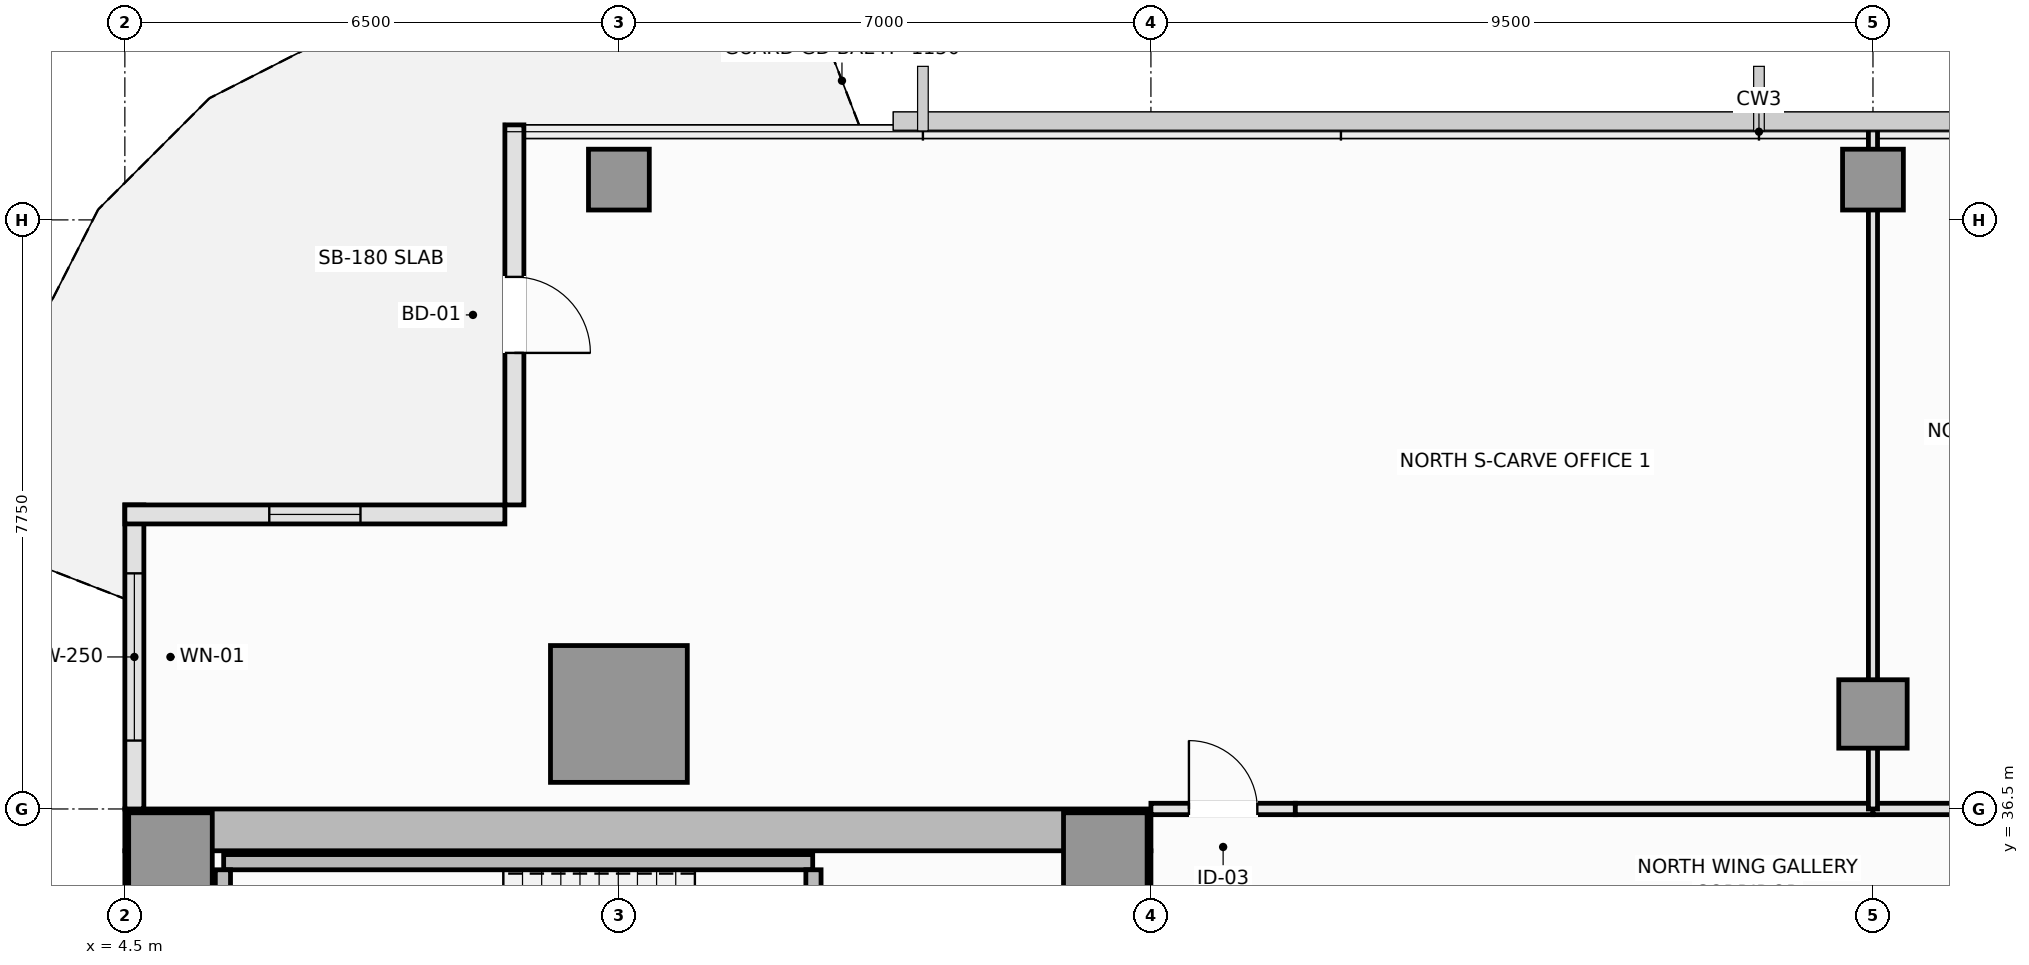
"""IFC4 building model, lengths in metres.
Left out: names, types, materials, properties, quantities, classifications, styles, units other than length and angle.
Written with IfcOpenShell. Run it as: python <this file> out.ifc"""

import sys

from ifc_helpers import new_model, si_unit, direction, frame, frame_2d, origin, origin_2d, place, context, subcontext, project, spatial, rectangle, extrude, element, fill, save


model = new_model("IFC4")
c1 = context("Model", 3, precision=1e-05, world=origin(), true_north=direction((0.0, 1.0)))
c2 = subcontext(c1, "Body", "Model", "MODEL_VIEW")
j1 = project(units=[si_unit("LENGTHUNIT", "METRE"), si_unit("PLANEANGLEUNIT", "RADIAN")], contexts=[c1])
p1 = place(None, origin())
s1 = spatial("IfcSite", under=j1, at=p1, CompositionType="ELEMENT")
p2 = place(p1, origin())
s2 = spatial("IfcBuilding", under=s1, at=p2, CompositionType="ELEMENT")
p3 = place(p2, frame((0.0, 0.0, 212.9)))
s3 = spatial("IfcBuildingStorey", under=s2, at=p3, CompositionType="ELEMENT", Elevation=212.9)
p4 = place(p3, frame((4.5, 36.225, 0.0), z_axis=(0.0, 0.0, 1.0), x_axis=(1.0, 0.0, 0.0)))
e1 = element("IfcWall", 1, at=p4, inside=s3, PredefinedType="SHEAR", context=c2, shape_type="SweptSolid", body=[
    extrude(rectangle(XDim=13.5, YDim=0.55, at=frame_2d((6.75, 0.0))), origin(), (0.0, 0.0, 1.0), 3.55),
])
p5 = place(p3, frame((4.775, 14.55, 0.0), z_axis=(0.0, 0.0, 1.0), x_axis=(0.0, 1.0, 0.0)))
e2 = element("IfcWall", 2, at=p5, inside=s3, PredefinedType="SHEAR", context=c2, shape_type="SweptSolid", body=[
    extrude(rectangle(XDim=21.4, YDim=0.55, at=frame_2d((10.7, 0.0))), origin(), (0.0, 0.0, 1.0), 3.55),
])
p6 = place(p3, frame((17.725, 27.05, 0.0), z_axis=(0.0, 0.0, 1.0), x_axis=(0.0, 1.0, 0.0)))
e3 = element("IfcWall", 3, at=p6, inside=s3, PredefinedType="SHEAR", context=c2, shape_type="SweptSolid", body=[
    extrude(rectangle(XDim=8.9, YDim=0.55, at=frame_2d((4.45, 0.0))), origin(), (0.0, 0.0, 1.0), 3.55),
])
p7 = place(p6, frame((3.45, 0.0, 0.0)))
e4 = element("IfcOpeningElement", 4, at=p7, cuts=e3, PredefinedType="OPENING", context=c2, shape_type="SweptSolid", body=[
    extrude(rectangle(XDim=1.1, YDim=2.15, at=frame_2d((0.55, 1.075))), frame((0.0, 0.285, 0.0), z_axis=(0.0, -1.0, 0.0), x_axis=(1.0, 0.0, 0.0)), (0.0, 0.0, 1.0), 0.57),
])
for number, where, z_axis, x_axis in (
    (5, (5.1, 35.9, 0.0), (0.0, 0.0, 1.0), (1.0, 0.0, 0.0)),
    (6, (17.4, 35.9, 0.0), (0.0, 0.0, 1.0), (1.0, 0.0, 0.0)),
):
    element("IfcColumn", number, at=place(p3, frame(where, z_axis=z_axis, x_axis=x_axis)), inside=s3, PredefinedType="PILASTER", context=c2, shape_type="SweptSolid", body=[
        extrude(rectangle(XDim=1.1, YDim=1.1, at=origin_2d()), origin(), (0.0, 0.0, 1.0), 3.55),
    ])
p8 = place(p3, frame((11.0, 37.75, 0.0), z_axis=(0.0, 0.0, 1.0), x_axis=(1.0, 0.0, 0.0)))
e7 = element("IfcColumn", 7, at=p8, inside=s3, PredefinedType="COLUMN", context=c2, shape_type="SweptSolid", body=[
    extrude(rectangle(XDim=1.8, YDim=1.8, at=origin_2d()), origin(), (0.0, 0.0, 1.0), 3.55),
])
p9 = place(p3, frame((27.5, 37.75, 0.0), z_axis=(0.0, 0.0, 1.0), x_axis=(1.0, 0.0, 0.0)))
e8 = element("IfcColumn", 8, at=p9, inside=s3, PredefinedType="COLUMN", context=c2, shape_type="SweptSolid", body=[
    extrude(rectangle(XDim=0.9, YDim=0.9, at=origin_2d()), origin(), (0.0, 0.0, 1.0), 3.55),
])
for number, where, z_axis, x_axis in (
    (9, (11.0, 44.78, 0.0), (0.0, 0.0, 1.0), (1.0, 0.0, 0.0)),
    (10, (27.5, 44.78, 0.0), (0.0, 0.0, 1.0), (1.0, 0.0, 0.0)),
):
    element("IfcColumn", number, at=place(p3, frame(where, z_axis=z_axis, x_axis=x_axis)), inside=s3, PredefinedType="COLUMN", context=c2, shape_type="SweptSolid", body=[
        extrude(rectangle(XDim=0.8, YDim=0.8, at=origin_2d()), origin(), (0.0, 0.0, 1.0), 3.55),
    ])
p10 = place(p3, frame((4.625, 40.5, 0.0), z_axis=(0.0, 0.0, 1.0), x_axis=(0.0, -1.0, 0.0)))
e11 = element("IfcWall", 11, at=p10, inside=s3, PredefinedType="SOLIDWALL", context=c2, shape_type="SweptSolid", body=[
    extrude(rectangle(XDim=4.0, YDim=0.25, at=frame_2d((2.0, 0.0))), origin(), (0.0, 0.0, 1.0), 3.37),
])
p11 = place(p10, frame((0.9, 0.0, 0.9)))
e12 = element("IfcOpeningElement", 12, at=p11, cuts=e11, PredefinedType="OPENING", context=c2, shape_type="SweptSolid", body=[
    extrude(rectangle(XDim=2.2, YDim=1.8, at=frame_2d((1.1, 0.9))), frame((0.0, 0.135, 0.0), z_axis=(0.0, -1.0, 0.0), x_axis=(1.0, 0.0, 0.0)), (0.0, 0.0, 1.0), 0.27),
])
p12 = place(p3, frame((9.625, 45.5, 0.0), z_axis=(0.0, 0.0, 1.0), x_axis=(0.0, -1.0, 0.0)))
e13 = element("IfcWall", 13, at=p12, inside=s3, PredefinedType="SOLIDWALL", context=c2, shape_type="SweptSolid", body=[
    extrude(rectangle(XDim=5.0, YDim=0.25, at=frame_2d((2.5, 0.0))), origin(), (0.0, 0.0, 1.0), 3.1),
])
p13 = place(p12, frame((2.0, 0.0, 0.0)))
e14 = element("IfcOpeningElement", 14, at=p13, cuts=e13, PredefinedType="OPENING", context=c2, shape_type="SweptSolid", body=[
    extrude(rectangle(XDim=1.0, YDim=2.2, at=frame_2d((0.5, 1.1))), frame((0.0, 0.135, 0.0), z_axis=(0.0, -1.0, 0.0), x_axis=(1.0, 0.0, 0.0)), (0.0, 0.0, 1.0), 0.27),
])
p14 = place(p3, frame((9.5, 40.375, 0.0), z_axis=(0.0, 0.0, 1.0), x_axis=(-1.0, 0.0, 0.0)))
e15 = element("IfcWall", 15, at=p14, inside=s3, PredefinedType="SOLIDWALL", context=c2, shape_type="SweptSolid", body=[
    extrude(rectangle(XDim=5.0, YDim=0.25, at=frame_2d((2.5, 0.0))), origin(), (0.0, 0.0, 1.0), 3.37),
])
p15 = place(p14, frame((1.9, 0.0, 0.9)))
e16 = element("IfcOpeningElement", 16, at=p15, cuts=e15, PredefinedType="OPENING", context=c2, shape_type="SweptSolid", body=[
    extrude(rectangle(XDim=1.2, YDim=1.8, at=frame_2d((0.6, 0.9))), frame((0.0, 0.135, 0.0), z_axis=(0.0, -1.0, 0.0), x_axis=(1.0, 0.0, 0.0)), (0.0, 0.0, 1.0), 0.27),
])
p16 = place(p3, frame((5.8, 35.8, 0.0), z_axis=(0.0, 0.0, 1.0), x_axis=(1.0, 0.0, 0.0)))
e17 = element("IfcWall", 17, at=p16, inside=s3, PredefinedType="SOLIDWALL", context=c2, shape_type="SweptSolid", body=[
    extrude(rectangle(XDim=7.75, YDim=0.2, at=frame_2d((3.875, 0.0))), origin(), (0.0, 0.0, 1.0), 3.55),
])
p17 = place(p3, frame((5.79, 32.65, 0.0), z_axis=(0.0, 0.0, 1.0), x_axis=(0.0, 1.0, 0.0)))
e18 = element("IfcWall", 18, at=p17, inside=s3, PredefinedType="SOLIDWALL", context=c2, shape_type="SweptSolid", body=[
    extrude(rectangle(XDim=3.05, YDim=0.2, at=frame_2d((1.525, 0.0))), origin(), (0.0, 0.0, 1.0), 3.55),
])
p18 = place(p3, frame((13.56, 32.65, 0.0), z_axis=(0.0, 0.0, 1.0), x_axis=(0.0, 1.0, 0.0)))
e19 = element("IfcWall", 19, at=p18, inside=s3, PredefinedType="SOLIDWALL", context=c2, shape_type="SweptSolid", body=[
    extrude(rectangle(XDim=3.05, YDim=0.2, at=frame_2d((1.525, 0.0))), origin(), (0.0, 0.0, 1.0), 3.55),
])
p19 = place(p18, frame((0.95, 0.0, 0.0)))
e20 = element("IfcOpeningElement", 20, at=p19, cuts=e19, PredefinedType="OPENING", context=c2, shape_type="SweptSolid", body=[
    extrude(rectangle(XDim=1.15, YDim=2.15, at=frame_2d((0.575, 1.075))), frame((0.0, 0.11, 0.0), z_axis=(0.0, -1.0, 0.0), x_axis=(1.0, 0.0, 0.0)), (0.0, 0.0, 1.0), 0.22),
])
p20 = place(p3, frame((18.0, 36.5, 0.0), z_axis=(0.0, 0.0, 1.0), x_axis=(1.0, 0.0, 0.0)))
e21 = element("IfcWall", 21, at=p20, inside=s3, PredefinedType="PARTITIONING", context=c2, shape_type="SweptSolid", body=[
    extrude(rectangle(XDim=1.9, YDim=0.15, at=frame_2d((0.95, 0.0))), origin(), (0.0, 0.0, 1.0), 3.37),
])
p21 = place(p20, frame((0.5, 0.0, 0.0)))
e22 = element("IfcOpeningElement", 22, at=p21, cuts=e21, PredefinedType="OPENING", context=c2, shape_type="SweptSolid", body=[
    extrude(rectangle(XDim=0.9, YDim=2.1, at=frame_2d((0.45, 1.05))), frame((0.0, 0.085, 0.0), z_axis=(0.0, -1.0, 0.0), x_axis=(1.0, 0.0, 0.0)), (0.0, 0.0, 1.0), 0.17),
])
p22 = place(p3, frame((19.9, 36.5, 0.0), z_axis=(0.0, 0.0, 1.0), x_axis=(1.0, 0.0, 0.0)))
e23 = element("IfcWall", 23, at=p22, inside=s3, PredefinedType="PARTITIONING", context=c2, shape_type="SweptSolid", body=[
    extrude(rectangle(XDim=7.6, YDim=0.15, at=frame_2d((3.8, 0.0))), origin(), (0.0, 0.0, 1.0), 3.37),
])
p23 = place(p3, frame((27.5, 36.5, 0.0), z_axis=(0.0, 0.0, 1.0), x_axis=(1.0, 0.0, 0.0)))
e24 = element("IfcWall", 24, at=p23, inside=s3, PredefinedType="PARTITIONING", context=c2, shape_type="SweptSolid", body=[
    extrude(rectangle(XDim=3.5, YDim=0.15, at=frame_2d((1.75, 0.0))), origin(), (0.0, 0.0, 1.0), 3.37),
])
p24 = place(p23, frame((1.25, 0.0, 0.0)))
e25 = element("IfcOpeningElement", 25, at=p24, cuts=e24, PredefinedType="OPENING", context=c2, shape_type="SweptSolid", body=[
    extrude(rectangle(XDim=1.0, YDim=2.15, at=frame_2d((0.5, 1.075))), frame((0.0, 0.085, 0.0), z_axis=(0.0, -1.0, 0.0), x_axis=(1.0, 0.0, 0.0)), (0.0, 0.0, 1.0), 0.17),
])
p25 = place(p3, frame((27.5, 36.5, 0.0), z_axis=(0.0, 0.0, 1.0), x_axis=(0.0, 1.0, 0.0)))
e26 = element("IfcWall", 26, at=p25, inside=s3, PredefinedType="PARTITIONING", context=c2, shape_type="SweptSolid", body=[
    extrude(rectangle(XDim=8.99, YDim=0.12, at=frame_2d((4.495, 0.0))), origin(), (0.0, 0.0, 1.0), 2.92),
])
p26 = place(p11, origin())
e27 = element("IfcWindow", 27, at=p26, inside=s3, PartitioningType="SINGLE_PANEL", PredefinedType="WINDOW", context=c2, shape_type="SweptSolid", body=[
    extrude(rectangle(XDim=2.2, YDim=1.8, at=frame_2d((1.1, 0.9))), frame((0.0, 0.03, 0.0), z_axis=(0.0, -1.0, 0.0), x_axis=(1.0, 0.0, 0.0)), (0.0, 0.0, 1.0), 0.06),
])
fill(e12, e27)
p27 = place(p13, frame((1.0, 0.0, 0.0), z_axis=(0.0, 0.0, 1.0), x_axis=(-1.0, 0.0, 0.0)))
e28 = element("IfcDoor", 28, at=p27, inside=s3, OperationType="SINGLE_SWING_RIGHT", PredefinedType="DOOR", context=c2, shape_type="SweptSolid", body=[
    extrude(rectangle(XDim=1.0, YDim=2.2, at=frame_2d((0.5, 1.1))), frame((0.0, 0.025, 0.0), z_axis=(0.0, -1.0, 0.0), x_axis=(1.0, 0.0, 0.0)), (0.0, 0.0, 1.0), 0.05),
])
fill(e14, e28)
p28 = place(p15, origin())
e29 = element("IfcWindow", 29, at=p28, inside=s3, PartitioningType="SINGLE_PANEL", PredefinedType="WINDOW", context=c2, shape_type="SweptSolid", body=[
    extrude(rectangle(XDim=1.2, YDim=1.8, at=frame_2d((0.6, 0.9))), frame((0.0, 0.03, 0.0), z_axis=(0.0, -1.0, 0.0), x_axis=(1.0, 0.0, 0.0)), (0.0, 0.0, 1.0), 0.06),
])
fill(e16, e29)
p29 = place(p21, origin())
e30 = element("IfcDoor", 30, at=p29, inside=s3, OperationType="SINGLE_SWING_LEFT", PredefinedType="DOOR", context=c2, shape_type="SweptSolid", body=[
    extrude(rectangle(XDim=0.9, YDim=2.1, at=frame_2d((0.45, 1.05))), frame((0.0, 0.025, 0.0), z_axis=(0.0, -1.0, 0.0), x_axis=(1.0, 0.0, 0.0)), (0.0, 0.0, 1.0), 0.05),
])
fill(e22, e30)
save(model, sys.argv[1])
